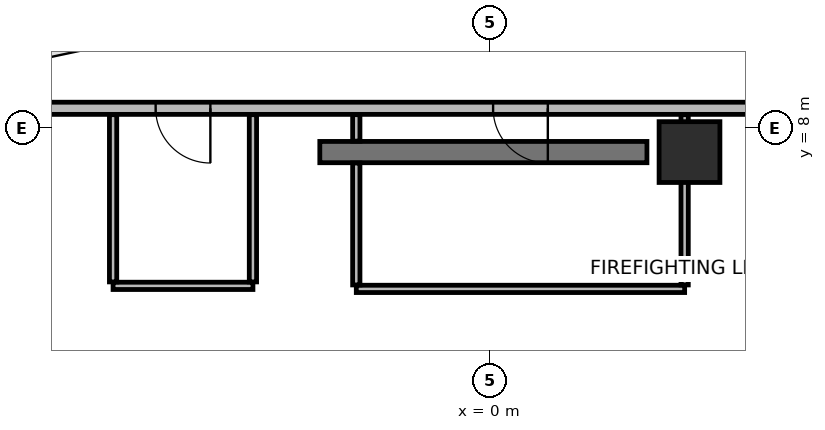
"""IFC4 building model, lengths in metres.
Left out: names, types, materials, properties, quantities, classifications, styles, units other than length and angle.
Written with IfcOpenShell. Run it as: python <this file> out.ifc"""

import sys

from ifc_helpers import new_model, si_unit, direction, frame, frame_2d, origin, origin_2d, place, context, subcontext, project, spatial, rectangle, extrude, element, fill, save


model = new_model("IFC4")
c1 = context("Model", 3, precision=1e-05, world=origin(), true_north=direction((0.0, 1.0)))
c2 = subcontext(c1, "Body", "Model", "MODEL_VIEW")
j1 = project(units=[si_unit("LENGTHUNIT", "METRE"), si_unit("PLANEANGLEUNIT", "RADIAN")], contexts=[c1])
p1 = place(None, origin())
s1 = spatial("IfcSite", under=j1, at=p1, CompositionType="ELEMENT")
p2 = place(p1, origin())
s2 = spatial("IfcBuilding", under=s1, at=p2, CompositionType="ELEMENT")
p3 = place(p2, frame((0.0, 0.0, 306.3)))
s3 = spatial("IfcBuildingStorey", under=s2, at=p3, CompositionType="ELEMENT", Elevation=306.3)
p4 = place(p3, frame((3.28, 7.6, 0.0), z_axis=(0.0, 0.0, 1.0), x_axis=(1.0, 0.0, 0.0)))
e1 = element("IfcColumn", 1, at=p4, inside=s3, PredefinedType="COLUMN", context=c2, shape_type="SweptSolid", body=[
    extrude(rectangle(XDim=1.0, YDim=1.0, at=origin_2d()), origin(), (0.0, 0.0, 1.0), 4.55),
])
p5 = place(p3, frame((-2.8, 7.6, 0.0), z_axis=(0.0, 0.0, 1.0), x_axis=(1.0, 0.0, 0.0)))
e2 = element("IfcWall", 2, at=p5, inside=s3, PredefinedType="SHEAR", context=c2, shape_type="SweptSolid", body=[
    extrude(rectangle(XDim=5.38, YDim=0.35, at=frame_2d((2.69, 0.0))), origin(), (0.0, 0.0, 1.0), 4.31),
])
p6 = place(p3, frame((9.62, 8.32, 0.0), z_axis=(0.0, 0.0, 1.0), x_axis=(-1.0, 0.0, 0.0)))
e3 = element("IfcWall", 3, at=p6, inside=s3, PredefinedType="PARTITIONING", context=c2, shape_type="SweptSolid", body=[
    extrude(rectangle(XDim=19.24, YDim=0.2, at=frame_2d((9.62, 0.0))), origin(), (0.0, 0.0, 1.0), 3.805),
])
p7 = place(p6, frame((8.67, 0.0, 0.0)))
e4 = element("IfcOpeningElement", 4, at=p7, cuts=e3, PredefinedType="OPENING", context=c2, shape_type="SweptSolid", body=[
    extrude(rectangle(XDim=0.9, YDim=2.1, at=frame_2d((0.45, 1.05))), frame((0.0, 0.11, 0.0), z_axis=(0.0, -1.0, 0.0), x_axis=(1.0, 0.0, 0.0)), (0.0, 0.0, 1.0), 0.22),
])
p8 = place(p6, frame((14.22, 0.0, 0.0)))
e5 = element("IfcOpeningElement", 5, at=p8, cuts=e3, PredefinedType="OPENING", context=c2, shape_type="SweptSolid", body=[
    extrude(rectangle(XDim=0.9, YDim=2.1, at=frame_2d((0.45, 1.05))), frame((0.0, 0.11, 0.0), z_axis=(0.0, -1.0, 0.0), x_axis=(1.0, 0.0, 0.0)), (0.0, 0.0, 1.0), 0.22),
])
p9 = place(p3, frame((-2.2, 5.35, 0.0), z_axis=(0.0, 0.0, 1.0), x_axis=(1.0, 0.0, 0.0)))
e6 = element("IfcWall", 6, at=p9, inside=s3, PredefinedType="PARTITIONING", context=c2, shape_type="SweptSolid", body=[
    extrude(rectangle(XDim=5.4, YDim=0.12, at=frame_2d((2.7, 0.0))), origin(), (0.0, 0.0, 1.0), 3.605),
])
p10 = place(p3, frame((3.2, 5.415, 0.0), z_axis=(0.0, 0.0, 1.0), x_axis=(0.0, 1.0, 0.0)))
e7 = element("IfcWall", 7, at=p10, inside=s3, PredefinedType="PARTITIONING", context=c2, shape_type="SweptSolid", body=[
    extrude(rectangle(XDim=2.8, YDim=0.12, at=frame_2d((1.4, 0.0))), origin(), (0.0, 0.0, 1.0), 3.605),
])
p11 = place(p3, frame((-2.2, 8.215, 0.0), z_axis=(0.0, 0.0, 1.0), x_axis=(0.0, -1.0, 0.0)))
e8 = element("IfcWall", 8, at=p11, inside=s3, PredefinedType="PARTITIONING", context=c2, shape_type="SweptSolid", body=[
    extrude(rectangle(XDim=0.435, YDim=0.12, at=frame_2d((0.218, 0.0))), origin(), (0.0, 0.0, 1.0), 3.605),
])
p12 = place(p3, frame((-2.2, 7.42, 0.0), z_axis=(0.0, 0.0, 1.0), x_axis=(0.0, -1.0, 0.0)))
e9 = element("IfcWall", 9, at=p12, inside=s3, PredefinedType="PARTITIONING", context=c2, shape_type="SweptSolid", body=[
    extrude(rectangle(XDim=2.005, YDim=0.12, at=frame_2d((1.002, 0.0))), origin(), (0.0, 0.0, 1.0), 3.605),
])
p13 = place(p3, frame((-6.2, 5.4, 0.0), z_axis=(0.0, 0.0, 1.0), x_axis=(1.0, 0.0, 0.0)))
e10 = element("IfcWall", 10, at=p13, inside=s3, PredefinedType="PARTITIONING", context=c2, shape_type="SweptSolid", body=[
    extrude(rectangle(XDim=2.3, YDim=0.12, at=frame_2d((1.15, 0.0))), origin(), (0.0, 0.0, 1.0), 4.31),
])
for number, where, z_axis, x_axis in (
    (11, (-3.9, 5.465, 0.0), (0.0, 0.0, 1.0), (0.0, 1.0, 0.0)),
    (12, (-6.2, 8.215, 0.0), (0.0, 0.0, 1.0), (0.0, -1.0, 0.0)),
):
    element("IfcWall", number, at=place(p3, frame(where, z_axis=z_axis, x_axis=x_axis)), inside=s3, PredefinedType="PARTITIONING", context=c2, shape_type="SweptSolid", body=[
        extrude(rectangle(XDim=2.75, YDim=0.12, at=frame_2d((1.375, 0.0))), origin(), (0.0, 0.0, 1.0), 3.605),
    ])
p14 = place(p7, origin())
e13 = element("IfcDoor", 13, at=p14, inside=s3, OperationType="SINGLE_SWING_LEFT", PredefinedType="DOOR", context=c2, shape_type="SweptSolid", body=[
    extrude(rectangle(XDim=0.9, YDim=2.1, at=frame_2d((0.45, 1.05))), frame((0.0, 0.025, 0.0), z_axis=(0.0, -1.0, 0.0), x_axis=(1.0, 0.0, 0.0)), (0.0, 0.0, 1.0), 0.05),
])
fill(e4, e13)
p15 = place(p8, origin())
e14 = element("IfcDoor", 14, at=p15, inside=s3, OperationType="SINGLE_SWING_LEFT", PredefinedType="DOOR", context=c2, shape_type="SweptSolid", body=[
    extrude(rectangle(XDim=0.9, YDim=2.1, at=frame_2d((0.45, 1.05))), frame((0.0, 0.025, 0.0), z_axis=(0.0, -1.0, 0.0), x_axis=(1.0, 0.0, 0.0)), (0.0, 0.0, 1.0), 0.05),
])
fill(e5, e14)
save(model, sys.argv[1])
